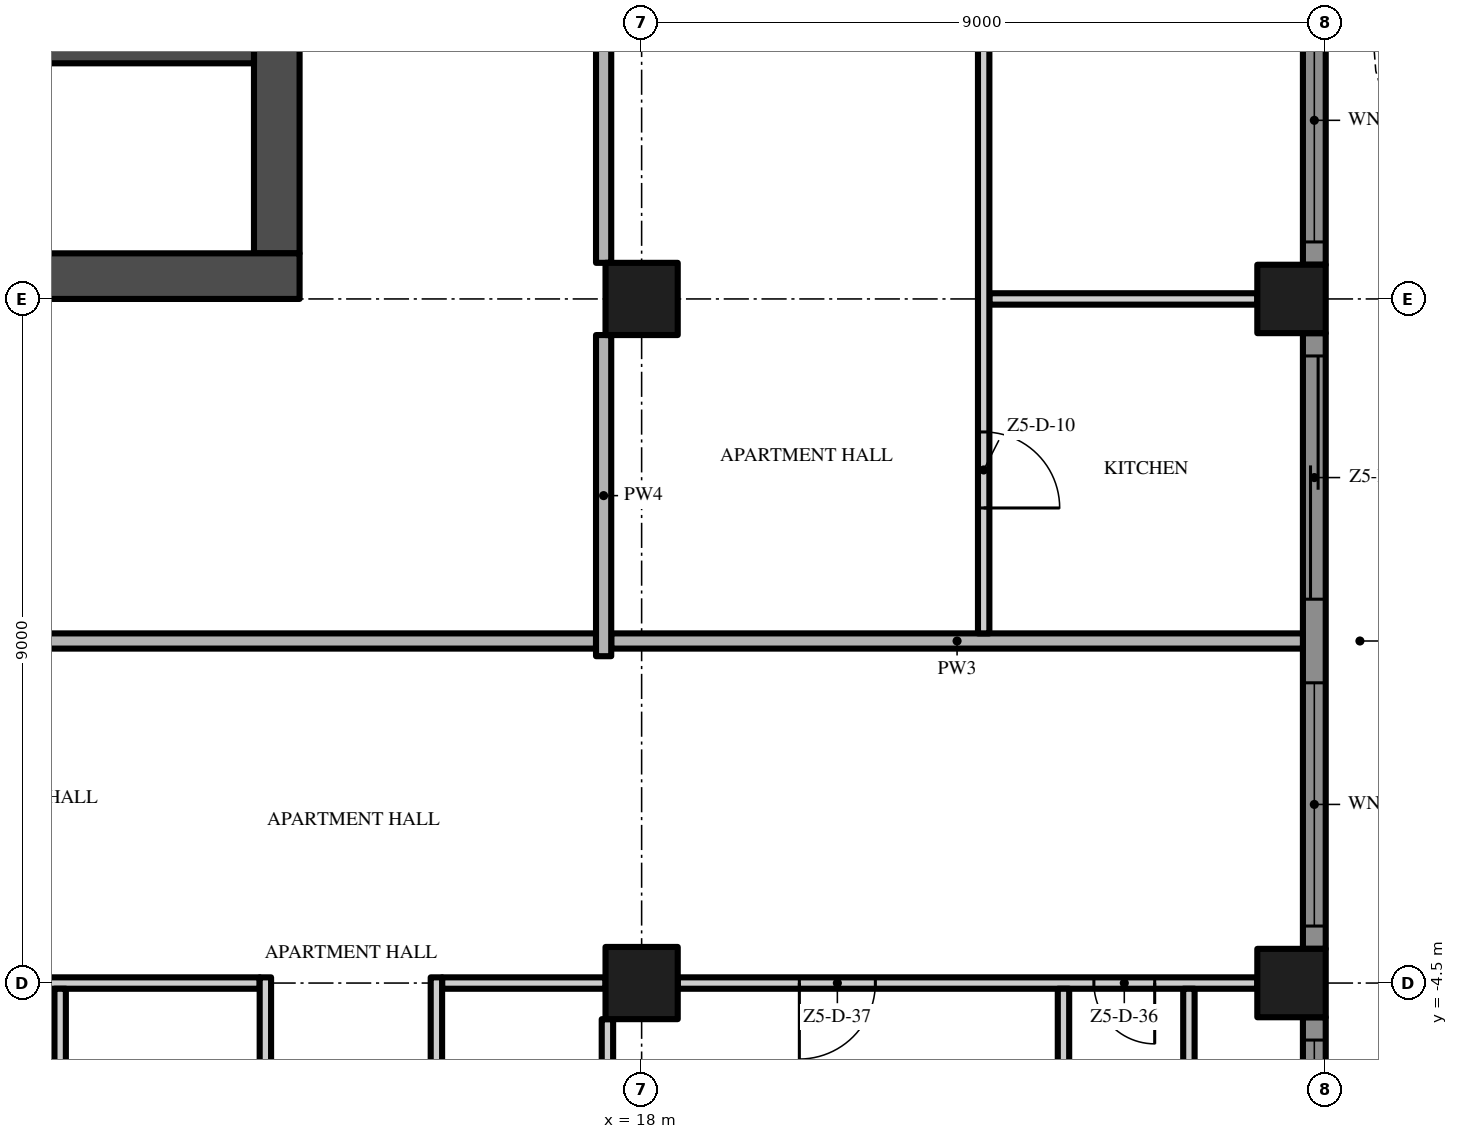
"""IFC4 building model, lengths in metres.
Left out: names, types, materials, properties, quantities, classifications, styles, units other than length and angle.
Written with IfcOpenShell. Run it as: python <this file> out.ifc"""

import sys

from ifc_helpers import new_model, si_unit, direction, frame, frame_2d, origin, origin_2d, place, context, subcontext, project, spatial, polyline, rectangle, outline, extrude, element, fill, save


model = new_model("IFC4")
c1 = context("Model", 3, precision=1e-05, world=origin(), true_north=direction((0.0, 1.0)))
c2 = subcontext(c1, "Body", "Model", "MODEL_VIEW")
j1 = project(units=[si_unit("LENGTHUNIT", "METRE"), si_unit("PLANEANGLEUNIT", "RADIAN")], contexts=[c1])
p1 = place(None, origin())
s1 = spatial("IfcSite", under=j1, at=p1, CompositionType="ELEMENT")
p2 = place(p1, origin())
s2 = spatial("IfcBuilding", under=s1, at=p2, CompositionType="ELEMENT")
p3 = place(p2, frame((0.0, 0.0, 273.0)))
s3 = spatial("IfcBuildingStorey", under=s2, at=p3, CompositionType="ELEMENT", Elevation=273.0)
p4 = place(p3, frame((-13.5, 4.8, -0.3), z_axis=(0.0, 0.0, 1.0), x_axis=(1.0, 0.0, 0.0)))
e1 = element("IfcWall", 1, at=p4, inside=s3, PredefinedType="SHEAR", context=c2, shape_type="SweptSolid", body=[
    extrude(rectangle(XDim=27.0, YDim=0.6, at=frame_2d((13.5, 0.0))), origin(), (0.0, 0.0, 1.0), 3.8),
])
p5 = place(p4, frame((12.0, 0.0, 0.3)))
e2 = element("IfcOpeningElement", 2, at=p5, cuts=e1, PredefinedType="OPENING", context=c2, shape_type="SweptSolid", body=[
    extrude(rectangle(XDim=3.0, YDim=2.4, at=frame_2d((1.5, 1.2))), frame((0.0, 0.31, 0.0), z_axis=(0.0, -1.0, 0.0), x_axis=(1.0, 0.0, 0.0)), (0.0, 0.0, 1.0), 0.62),
])
p6 = place(p4, frame((4.9, 0.0, 0.3)))
e3 = element("IfcOpeningElement", 3, at=p6, cuts=e1, PredefinedType="OPENING", context=c2, shape_type="SweptSolid", body=[
    extrude(rectangle(XDim=1.2, YDim=2.2, at=frame_2d((0.6, 1.1))), frame((0.0, 0.31, 0.0), z_axis=(0.0, -1.0, 0.0), x_axis=(1.0, 0.0, 0.0)), (0.0, 0.0, 1.0), 0.62),
])
p7 = place(p4, frame((20.75, 0.0, 0.3)))
e4 = element("IfcOpeningElement", 4, at=p7, cuts=e1, PredefinedType="OPENING", context=c2, shape_type="SweptSolid", body=[
    extrude(rectangle(XDim=1.5, YDim=2.2, at=frame_2d((0.75, 1.1))), frame((0.0, 0.31, 0.0), z_axis=(0.0, -1.0, 0.0), x_axis=(1.0, 0.0, 0.0)), (0.0, 0.0, 1.0), 0.62),
])
p8 = place(p4, frame((17.4, 0.0, 0.3)))
e5 = element("IfcOpeningElement", 5, at=p8, cuts=e1, PredefinedType="OPENING", context=c2, shape_type="SweptSolid", body=[
    extrude(rectangle(XDim=1.2, YDim=2.2, at=frame_2d((0.6, 1.1))), frame((0.0, 0.31, 0.0), z_axis=(0.0, -1.0, 0.0), x_axis=(1.0, 0.0, 0.0)), (0.0, 0.0, 1.0), 0.62),
])
p9 = place(p3, frame((13.2, 5.1, -0.3), z_axis=(0.0, 0.0, 1.0), x_axis=(0.0, 1.0, 0.0)))
e6 = element("IfcWall", 6, at=p9, inside=s3, PredefinedType="SHEAR", context=c2, shape_type="SweptSolid", body=[
    extrude(rectangle(XDim=16.8, YDim=0.6, at=frame_2d((8.4, 0.0))), origin(), (0.0, 0.0, 1.0), 3.8),
])
p10 = place(p9, frame((6.3, 0.0, 0.3)))
e7 = element("IfcOpeningElement", 7, at=p10, cuts=e6, PredefinedType="OPENING", context=c2, shape_type="SweptSolid", body=[
    extrude(rectangle(XDim=1.2, YDim=2.2, at=frame_2d((0.6, 1.1))), frame((0.0, 0.31, 0.0), z_axis=(0.0, -1.0, 0.0), x_axis=(1.0, 0.0, 0.0)), (0.0, 0.0, 1.0), 0.62),
])
for number, where, z_axis, x_axis in (
    (8, (18.0, -4.5, 0.0), (0.0, 0.0, 1.0), (1.0, 0.0, 0.0)),
    (9, (18.0, 4.5, 0.0), (0.0, 0.0, 1.0), (1.0, 0.0, 0.0)),
):
    element("IfcColumn", number, at=place(p3, frame(where, z_axis=z_axis, x_axis=x_axis)), inside=s3, PredefinedType="COLUMN", context=c2, shape_type="SweptSolid", body=[
        extrude(rectangle(XDim=0.95, YDim=0.95, at=origin_2d()), origin(), (0.0, 0.0, 1.0), 3.5),
    ])
for number, where, z_axis, x_axis in (
    (10, (26.55, -4.5, 0.0), (0.0, 0.0, 1.0), (1.0, 0.0, 0.0)),
    (11, (26.55, 4.5, 0.0), (0.0, 0.0, 1.0), (1.0, 0.0, 0.0)),
):
    element("IfcColumn", number, at=place(p3, frame(where, z_axis=z_axis, x_axis=x_axis)), inside=s3, PredefinedType="COLUMN", context=c2, shape_type="SweptSolid", body=[
        extrude(rectangle(XDim=0.9, YDim=0.9, at=origin_2d()), origin(), (0.0, 0.0, 1.0), 3.5),
    ])
p11 = place(p3, frame((26.85, -4.95, 0.0), z_axis=(0.0, 0.0, 1.0), x_axis=(0.0, -1.0, 0.0)))
e12 = element("IfcWall", 12, at=p11, inside=s3, PredefinedType="SOLIDWALL", context=c2, shape_type="SweptSolid", body=[
    extrude(rectangle(XDim=8.1, YDim=0.3, at=frame_2d((4.05, 0.0))), origin(), (0.0, 0.0, 1.0), 3.5),
])
p12 = place(p11, frame((4.6, 0.0, 0.45)))
e13 = element("IfcOpeningElement", 13, at=p12, cuts=e12, PredefinedType="OPENING", context=c2, shape_type="SweptSolid", body=[
    extrude(rectangle(XDim=3.2, YDim=2.65, at=frame_2d((1.6, 1.325))), frame((0.0, 0.16, 0.0), z_axis=(0.0, -1.0, 0.0), x_axis=(1.0, 0.0, 0.0)), (0.0, 0.0, 1.0), 0.32),
])
p13 = place(p11, frame((0.3, 0.0, 0.45)))
e14 = element("IfcOpeningElement", 14, at=p13, cuts=e12, PredefinedType="OPENING", context=c2, shape_type="SweptSolid", body=[
    extrude(rectangle(XDim=3.2, YDim=2.65, at=frame_2d((1.6, 1.325))), frame((0.0, 0.16, 0.0), z_axis=(0.0, -1.0, 0.0), x_axis=(1.0, 0.0, 0.0)), (0.0, 0.0, 1.0), 0.32),
])
p14 = place(p3, frame((26.85, 4.05, 0.0), z_axis=(0.0, 0.0, 1.0), x_axis=(0.0, -1.0, 0.0)))
e15 = element("IfcWall", 15, at=p14, inside=s3, PredefinedType="SOLIDWALL", context=c2, shape_type="SweptSolid", body=[
    extrude(rectangle(XDim=8.1, YDim=0.3, at=frame_2d((4.05, 0.0))), origin(), (0.0, 0.0, 1.0), 3.5),
])
p15 = place(p14, frame((4.6, 0.0, 0.45)))
e16 = element("IfcOpeningElement", 16, at=p15, cuts=e15, PredefinedType="OPENING", context=c2, shape_type="SweptSolid", body=[
    extrude(rectangle(XDim=3.2, YDim=2.65, at=frame_2d((1.6, 1.325))), frame((0.0, 0.16, 0.0), z_axis=(0.0, -1.0, 0.0), x_axis=(1.0, 0.0, 0.0)), (0.0, 0.0, 1.0), 0.32),
])
p16 = place(p14, frame((0.3, 0.0, 0.0)))
e17 = element("IfcOpeningElement", 17, at=p16, cuts=e15, PredefinedType="OPENING", context=c2, shape_type="SweptSolid", body=[
    extrude(rectangle(XDim=3.2, YDim=2.4, at=frame_2d((1.6, 1.2))), frame((0.0, 0.16, 0.0), z_axis=(0.0, -1.0, 0.0), x_axis=(1.0, 0.0, 0.0)), (0.0, 0.0, 1.0), 0.32),
])
p17 = place(p3, frame((26.85, 13.05, 0.0), z_axis=(0.0, 0.0, 1.0), x_axis=(0.0, -1.0, 0.0)))
e18 = element("IfcWall", 18, at=p17, inside=s3, PredefinedType="SOLIDWALL", context=c2, shape_type="SweptSolid", body=[
    extrude(rectangle(XDim=8.1, YDim=0.3, at=frame_2d((4.05, 0.0))), origin(), (0.0, 0.0, 1.0), 3.5),
])
p18 = place(p17, frame((4.6, 0.0, 0.45)))
e19 = element("IfcOpeningElement", 19, at=p18, cuts=e18, PredefinedType="OPENING", context=c2, shape_type="SweptSolid", body=[
    extrude(rectangle(XDim=3.2, YDim=2.65, at=frame_2d((1.6, 1.325))), frame((0.0, 0.16, 0.0), z_axis=(0.0, -1.0, 0.0), x_axis=(1.0, 0.0, 0.0)), (0.0, 0.0, 1.0), 0.32),
])
p19 = place(p17, frame((0.3, 0.0, 0.45)))
e20 = element("IfcOpeningElement", 20, at=p19, cuts=e18, PredefinedType="OPENING", context=c2, shape_type="SweptSolid", body=[
    extrude(rectangle(XDim=3.2, YDim=2.65, at=frame_2d((1.6, 1.325))), frame((0.0, 0.16, 0.0), z_axis=(0.0, -1.0, 0.0), x_axis=(1.0, 0.0, 0.0)), (0.0, 0.0, 1.0), 0.32),
])
p20 = place(p3, origin())
e21 = element("IfcWall", 21, at=p20, inside=s3, PredefinedType="USERDEFINED", context=c2, shape_type="SweptSolid", body=[
    extrude(outline(polyline([(28.8, -18.0), (29.505, -16.5), (29.941, -15.0), (30.0, -14.25), (29.941, -13.5), (29.505, -12.0), (28.8, -10.5), (28.095, -9.0), (27.659, -7.5), (27.6, -6.75), (27.659, -6.0), (28.095, -4.5), (28.8, -3.0), (29.505, -1.5), (29.941, 0.0), (30.0, 0.75), (29.941, 1.5), (29.505, 3.0), (28.8, 4.5), (28.095, 6.0), (27.659, 7.5), (27.6, 8.25), (27.659, 9.0), (28.095, 10.5), (28.8, 12.0), (29.505, 13.5), (29.941, 15.0), (30.0, 15.75), (29.941, 16.5), (29.505, 18.0), (29.265, 17.93), (29.694, 16.455), (29.749, 15.75), (29.694, 15.045), (29.271, 13.589), (28.574, 12.106), (27.86, 10.589), (27.411, 9.045), (27.349, 8.25), (27.411, 7.455), (27.86, 5.911), (28.574, 4.394), (29.271, 2.911), (29.694, 1.455), (29.749, 0.75), (29.694, 0.045), (29.271, -1.411), (28.574, -2.894), (27.86, -4.411), (27.411, -5.955), (27.349, -6.75), (27.411, -7.545), (27.86, -9.089), (28.574, -10.606), (29.271, -12.089), (29.694, -13.545), (29.749, -14.25), (29.694, -14.955), (29.271, -16.411), (28.574, -17.894), (28.8, -18.0)])), origin(), (0.0, 0.0, 1.0), 0.9),
])
p21 = place(p3, frame((9.65, 7.7, 0.0), z_axis=(0.0, 0.0, 1.0), x_axis=(1.0, 0.0, 0.0)))
e22 = element("IfcWall", 22, at=p21, inside=s3, PredefinedType="SHEAR", context=c2, shape_type="SweptSolid", body=[
    extrude(rectangle(XDim=3.25, YDim=0.2, at=frame_2d((1.625, 0.0))), origin(), (0.0, 0.0, 1.0), 3.5),
])
p22 = place(p3, frame((9.475, -4.5, 0.0), z_axis=(0.0, 0.0, 1.0), x_axis=(1.0, 0.0, 0.0)))
e23 = element("IfcWall", 23, at=p22, inside=s3, PredefinedType="PARTITIONING", context=c2, shape_type="SweptSolid", body=[
    extrude(rectangle(XDim=3.5, YDim=0.15, at=frame_2d((1.75, 0.0))), origin(), (0.0, 0.0, 1.0), 3.5),
])
p23 = place(p3, frame((15.375, -4.5, 0.0), z_axis=(0.0, 0.0, 1.0), x_axis=(1.0, 0.0, 0.0)))
e24 = element("IfcWall", 24, at=p23, inside=s3, PredefinedType="PARTITIONING", context=c2, shape_type="SweptSolid", body=[
    extrude(rectangle(XDim=2.15, YDim=0.15, at=frame_2d((1.075, 0.0))), origin(), (0.0, 0.0, 1.0), 3.5),
])
p24 = place(p3, frame((26.1, -4.5, 0.0), z_axis=(0.0, 0.0, 1.0), x_axis=(-1.0, 0.0, 0.0)))
e25 = element("IfcWall", 25, at=p24, inside=s3, PredefinedType="PARTITIONING", context=c2, shape_type="SweptSolid", body=[
    extrude(rectangle(XDim=7.625, YDim=0.15, at=frame_2d((3.812, 0.0))), origin(), (0.0, 0.0, 1.0), 3.5),
])
p25 = place(p24, frame((1.35, 0.0, 0.0)))
e26 = element("IfcOpeningElement", 26, at=p25, cuts=e25, PredefinedType="OPENING", context=c2, shape_type="SweptSolid", body=[
    extrude(rectangle(XDim=0.8, YDim=2.0, at=frame_2d((0.4, 1.0))), frame((0.0, 0.085, 0.0), z_axis=(0.0, -1.0, 0.0), x_axis=(1.0, 0.0, 0.0)), (0.0, 0.0, 1.0), 0.17),
])
p26 = place(p24, frame((5.025, 0.0, 0.0)))
e27 = element("IfcOpeningElement", 27, at=p26, cuts=e25, PredefinedType="OPENING", context=c2, shape_type="SweptSolid", body=[
    extrude(rectangle(XDim=1.0, YDim=2.4, at=frame_2d((0.5, 1.2))), frame((0.0, 0.085, 0.0), z_axis=(0.0, -1.0, 0.0), x_axis=(1.0, 0.0, 0.0)), (0.0, 0.0, 1.0), 0.17),
])
p27 = place(p3, frame((17.4, 0.0, 0.0), z_axis=(0.0, 0.0, 1.0), x_axis=(-1.0, 0.0, 0.0)))
e28 = element("IfcWall", 28, at=p27, inside=s3, PredefinedType="PARTITIONING", context=c2, shape_type="SweptSolid", body=[
    extrude(rectangle(XDim=34.8, YDim=0.2, at=frame_2d((17.4, 0.0))), origin(), (0.0, 0.0, 1.0), 3.5),
])
p28 = place(p27, frame((25.65, 0.0, 0.0)))
e29 = element("IfcOpeningElement", 29, at=p28, cuts=e28, PredefinedType="OPENING", context=c2, shape_type="SweptSolid", body=[
    extrude(rectangle(XDim=1.5, YDim=2.4, at=frame_2d((0.75, 1.2))), frame((0.0, 0.11, 0.0), z_axis=(0.0, -1.0, 0.0), x_axis=(1.0, 0.0, 0.0)), (0.0, 0.0, 1.0), 0.22),
])
p29 = place(p27, frame((7.65, 0.0, 0.0)))
e30 = element("IfcOpeningElement", 30, at=p29, cuts=e28, PredefinedType="OPENING", context=c2, shape_type="SweptSolid", body=[
    extrude(rectangle(XDim=1.5, YDim=2.4, at=frame_2d((0.75, 1.2))), frame((0.0, 0.11, 0.0), z_axis=(0.0, -1.0, 0.0), x_axis=(1.0, 0.0, 0.0)), (0.0, 0.0, 1.0), 0.22),
])
p30 = place(p3, frame((17.6, 0.0, 0.0), z_axis=(0.0, 0.0, 1.0), x_axis=(1.0, 0.0, 0.0)))
e31 = element("IfcWall", 31, at=p30, inside=s3, PredefinedType="PARTITIONING", context=c2, shape_type="SweptSolid", body=[
    extrude(rectangle(XDim=9.1, YDim=0.2, at=frame_2d((4.55, 0.0))), origin(), (0.0, 0.0, 1.0), 3.5),
])
p31 = place(p3, frame((22.575, 4.5, 0.0), z_axis=(0.0, 0.0, 1.0), x_axis=(1.0, 0.0, 0.0)))
e32 = element("IfcWall", 32, at=p31, inside=s3, PredefinedType="PARTITIONING", context=c2, shape_type="SweptSolid", body=[
    extrude(rectangle(XDim=3.525, YDim=0.15, at=frame_2d((1.762, 0.0))), origin(), (0.0, 0.0, 1.0), 3.5),
])
p32 = place(p3, frame((10.35, -8.925, 0.0), z_axis=(0.0, 0.0, 1.0), x_axis=(0.0, 1.0, 0.0)))
e33 = element("IfcWall", 33, at=p32, inside=s3, PredefinedType="PARTITIONING", context=c2, shape_type="SweptSolid", body=[
    extrude(rectangle(XDim=4.35, YDim=0.15, at=frame_2d((2.175, 0.0))), origin(), (0.0, 0.0, 1.0), 3.5),
])
p33 = place(p3, frame((13.05, -8.925, 0.0), z_axis=(0.0, 0.0, 1.0), x_axis=(0.0, 1.0, 0.0)))
e34 = element("IfcWall", 34, at=p33, inside=s3, PredefinedType="PARTITIONING", context=c2, shape_type="SweptSolid", body=[
    extrude(rectangle(XDim=4.5, YDim=0.15, at=frame_2d((2.25, 0.0))), origin(), (0.0, 0.0, 1.0), 3.5),
])
p34 = place(p3, frame((15.3, -4.425, 0.0), z_axis=(0.0, 0.0, 1.0), x_axis=(0.0, -1.0, 0.0)))
e35 = element("IfcWall", 35, at=p34, inside=s3, PredefinedType="PARTITIONING", context=c2, shape_type="SweptSolid", body=[
    extrude(rectangle(XDim=4.65, YDim=0.15, at=frame_2d((2.325, 0.0))), origin(), (0.0, 0.0, 1.0), 3.5),
])
p35 = place(p34, frame((1.875, 0.0, 0.0)))
e36 = element("IfcOpeningElement", 36, at=p35, cuts=e35, PredefinedType="OPENING", context=c2, shape_type="SweptSolid", body=[
    extrude(rectangle(XDim=0.9, YDim=2.1, at=frame_2d((0.45, 1.05))), frame((0.0, 0.085, 0.0), z_axis=(0.0, -1.0, 0.0), x_axis=(1.0, 0.0, 0.0)), (0.0, 0.0, 1.0), 0.17),
])
p36 = place(p3, frame((17.5, -0.2, 0.0), z_axis=(0.0, 0.0, 1.0), x_axis=(0.0, 1.0, 0.0)))
e37 = element("IfcWall", 37, at=p36, inside=s3, PredefinedType="PARTITIONING", context=c2, shape_type="SweptSolid", body=[
    extrude(rectangle(XDim=4.225, YDim=0.2, at=frame_2d((2.112, 0.0))), origin(), (0.0, 0.0, 1.0), 3.5),
])
p37 = place(p3, frame((17.5, 13.025, 0.0), z_axis=(0.0, 0.0, 1.0), x_axis=(0.0, -1.0, 0.0)))
e38 = element("IfcWall", 38, at=p37, inside=s3, PredefinedType="PARTITIONING", context=c2, shape_type="SweptSolid", body=[
    extrude(rectangle(XDim=8.05, YDim=0.2, at=frame_2d((4.025, 0.0))), origin(), (0.0, 0.0, 1.0), 3.5),
])
p38 = place(p37, frame((3.425, 0.0, 0.0)))
e39 = element("IfcOpeningElement", 39, at=p38, cuts=e38, PredefinedType="OPENING", context=c2, shape_type="SweptSolid", body=[
    extrude(rectangle(XDim=1.2, YDim=2.4, at=frame_2d((0.6, 1.2))), frame((0.0, 0.11, 0.0), z_axis=(0.0, -1.0, 0.0), x_axis=(1.0, 0.0, 0.0)), (0.0, 0.0, 1.0), 0.22),
])
p39 = place(p3, frame((17.55, -8.925, 0.0), z_axis=(0.0, 0.0, 1.0), x_axis=(0.0, 1.0, 0.0)))
e40 = element("IfcWall", 40, at=p39, inside=s3, PredefinedType="PARTITIONING", context=c2, shape_type="SweptSolid", body=[
    extrude(rectangle(XDim=3.95, YDim=0.15, at=frame_2d((1.975, 0.0))), origin(), (0.0, 0.0, 1.0), 3.5),
])
p40 = place(p3, frame((22.5, 17.55, 0.0), z_axis=(0.0, 0.0, 1.0), x_axis=(0.0, -1.0, 0.0)))
e41 = element("IfcWall", 41, at=p40, inside=s3, PredefinedType="PARTITIONING", context=c2, shape_type="SweptSolid", body=[
    extrude(rectangle(XDim=17.45, YDim=0.15, at=frame_2d((8.725, 0.0))), origin(), (0.0, 0.0, 1.0), 3.5),
])
p41 = place(p40, frame((14.8, 0.0, 0.0)))
e42 = element("IfcOpeningElement", 42, at=p41, cuts=e41, PredefinedType="OPENING", context=c2, shape_type="SweptSolid", body=[
    extrude(rectangle(XDim=1.0, YDim=2.4, at=frame_2d((0.5, 1.2))), frame((0.0, 0.085, 0.0), z_axis=(0.0, -1.0, 0.0), x_axis=(1.0, 0.0, 0.0)), (0.0, 0.0, 1.0), 0.17),
])
p42 = place(p40, frame((7.65, 0.0, 0.0)))
e43 = element("IfcOpeningElement", 43, at=p42, cuts=e41, PredefinedType="OPENING", context=c2, shape_type="SweptSolid", body=[
    extrude(rectangle(XDim=1.8, YDim=2.4, at=frame_2d((0.9, 1.2))), frame((0.0, 0.085, 0.0), z_axis=(0.0, -1.0, 0.0), x_axis=(1.0, 0.0, 0.0)), (0.0, 0.0, 1.0), 0.17),
])
for number, where, z_axis, x_axis in (
    (44, (23.55, -8.925, 0.0), (0.0, 0.0, 1.0), (0.0, 1.0, 0.0)),
    (45, (25.2, -8.925, 0.0), (0.0, 0.0, 1.0), (0.0, 1.0, 0.0)),
):
    element("IfcWall", number, at=place(p3, frame(where, z_axis=z_axis, x_axis=x_axis)), inside=s3, PredefinedType="PARTITIONING", context=c2, shape_type="SweptSolid", body=[
        extrude(rectangle(XDim=4.35, YDim=0.15, at=frame_2d((2.175, 0.0))), origin(), (0.0, 0.0, 1.0), 3.5),
    ])
p43 = place(p13, origin())
e46 = element("IfcWindow", 46, at=p43, inside=s3, PartitioningType="SINGLE_PANEL", PredefinedType="WINDOW", context=c2, shape_type="SweptSolid", body=[
    extrude(rectangle(XDim=3.2, YDim=2.65, at=frame_2d((1.6, 1.325))), frame((0.0, 0.03, 0.0), z_axis=(0.0, -1.0, 0.0), x_axis=(1.0, 0.0, 0.0)), (0.0, 0.0, 1.0), 0.06),
])
fill(e14, e46)
p44 = place(p15, origin())
e47 = element("IfcWindow", 47, at=p44, inside=s3, PartitioningType="SINGLE_PANEL", PredefinedType="WINDOW", context=c2, shape_type="SweptSolid", body=[
    extrude(rectangle(XDim=3.2, YDim=2.65, at=frame_2d((1.6, 1.325))), frame((0.0, 0.03, 0.0), z_axis=(0.0, -1.0, 0.0), x_axis=(1.0, 0.0, 0.0)), (0.0, 0.0, 1.0), 0.06),
])
fill(e16, e47)
p45 = place(p16, origin())
e48 = element("IfcDoor", 48, at=p45, inside=s3, OperationType="SINGLE_SWING_LEFT", PredefinedType="DOOR", context=c2, shape_type="SweptSolid", body=[
    extrude(rectangle(XDim=3.2, YDim=2.4, at=frame_2d((1.6, 1.2))), frame((0.0, 0.025, 0.0), z_axis=(0.0, -1.0, 0.0), x_axis=(1.0, 0.0, 0.0)), (0.0, 0.0, 1.0), 0.05),
])
fill(e17, e48)
p46 = place(p18, origin())
e49 = element("IfcWindow", 49, at=p46, inside=s3, PartitioningType="SINGLE_PANEL", PredefinedType="WINDOW", context=c2, shape_type="SweptSolid", body=[
    extrude(rectangle(XDim=3.2, YDim=2.65, at=frame_2d((1.6, 1.325))), frame((0.0, 0.03, 0.0), z_axis=(0.0, -1.0, 0.0), x_axis=(1.0, 0.0, 0.0)), (0.0, 0.0, 1.0), 0.06),
])
fill(e19, e49)
p47 = place(p41, origin())
e50 = element("IfcDoor", 50, at=p47, inside=s3, OperationType="SINGLE_SWING_RIGHT", PredefinedType="DOOR", context=c2, shape_type="SweptSolid", body=[
    extrude(rectangle(XDim=1.0, YDim=2.4, at=frame_2d((0.5, 1.2))), frame((0.0, 0.025, 0.0), z_axis=(0.0, -1.0, 0.0), x_axis=(1.0, 0.0, 0.0)), (0.0, 0.0, 1.0), 0.05),
])
fill(e42, e50)
p48 = place(p25, origin())
e51 = element("IfcDoor", 51, at=p48, inside=s3, OperationType="SINGLE_SWING_LEFT", PredefinedType="DOOR", context=c2, shape_type="SweptSolid", body=[
    extrude(rectangle(XDim=0.8, YDim=2.0, at=frame_2d((0.4, 1.0))), frame((0.0, 0.025, 0.0), z_axis=(0.0, -1.0, 0.0), x_axis=(1.0, 0.0, 0.0)), (0.0, 0.0, 1.0), 0.05),
])
fill(e26, e51)
p49 = place(p26, origin())
e52 = element("IfcDoor", 52, at=p49, inside=s3, OperationType="SINGLE_SWING_RIGHT", PredefinedType="DOOR", context=c2, shape_type="SweptSolid", body=[
    extrude(rectangle(XDim=1.0, YDim=2.4, at=frame_2d((0.5, 1.2))), frame((0.0, 0.025, 0.0), z_axis=(0.0, -1.0, 0.0), x_axis=(1.0, 0.0, 0.0)), (0.0, 0.0, 1.0), 0.05),
])
fill(e27, e52)
save(model, sys.argv[1])
